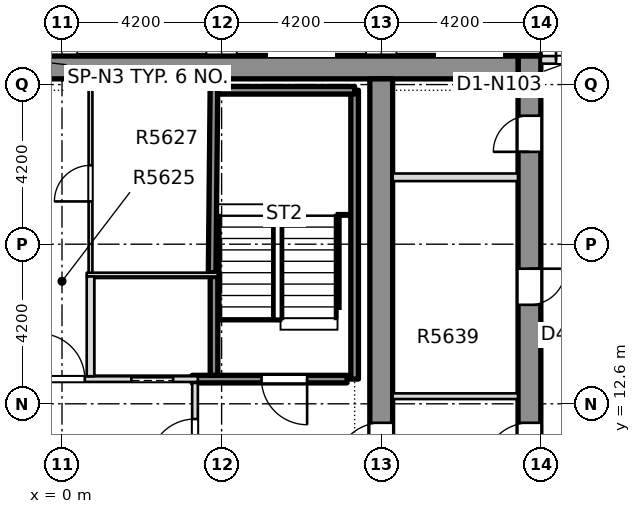
"""IFC4 building model, lengths in metres.
Left out: names, types, materials, properties, quantities, classifications, styles, units other than length and angle.
Written with IfcOpenShell. Run it as: python <this file> out.ifc"""

import sys

from ifc_helpers import new_model, si_unit, direction, frame, frame_2d, origin, place, context, subcontext, project, spatial, rectangle, extrude, element, fill, save


model = new_model("IFC4")
c1 = context("Model", 3, precision=1e-05, world=origin(), true_north=direction((0.0, 1.0)))
c2 = subcontext(c1, "Body", "Model", "MODEL_VIEW")
j1 = project(units=[si_unit("LENGTHUNIT", "METRE"), si_unit("PLANEANGLEUNIT", "RADIAN")], contexts=[c1])
p1 = place(None, origin())
s1 = spatial("IfcSite", under=j1, at=p1, CompositionType="ELEMENT")
p2 = place(p1, origin())
s2 = spatial("IfcBuilding", under=s1, at=p2, CompositionType="ELEMENT")
p3 = place(p2, frame((0.0, 0.0, 213.5)))
s3 = spatial("IfcBuildingStorey", under=s2, at=p3, CompositionType="ELEMENT", Elevation=213.5)
p4 = place(p3, frame((12.3, -8.4, -0.4), z_axis=(0.0, 0.0, 1.0), x_axis=(0.0, 1.0, 0.0)))
e1 = element("IfcWall", 1, at=p4, inside=s3, PredefinedType="SHEAR", context=c2, shape_type="SweptSolid", body=[
    extrude(rectangle(XDim=30.15, YDim=0.6, at=frame_2d((15.075, 0.0))), origin(), (0.0, 0.0, 1.0), 3.4),
])
p5 = place(p4, frame((3.416, 0.0, 0.4)))
e2 = element("IfcOpeningElement", 2, at=p5, cuts=e1, PredefinedType="OPENING", context=c2, shape_type="SweptSolid", body=[
    extrude(rectangle(XDim=0.95, YDim=2.1, at=frame_2d((0.475, 1.05))), frame((0.0, 0.31, 0.0), z_axis=(0.0, -1.0, 0.0), x_axis=(1.0, 0.0, 0.0)), (0.0, 0.0, 1.0), 0.62),
])
p6 = place(p4, frame((7.932, 0.0, 0.4)))
e3 = element("IfcOpeningElement", 3, at=p6, cuts=e1, PredefinedType="OPENING", context=c2, shape_type="SweptSolid", body=[
    extrude(rectangle(XDim=0.95, YDim=2.1, at=frame_2d((0.475, 1.05))), frame((0.0, 0.31, 0.0), z_axis=(0.0, -1.0, 0.0), x_axis=(1.0, 0.0, 0.0)), (0.0, 0.0, 1.0), 0.62),
])
p7 = place(p4, frame((12.144, 0.0, 0.4)))
e4 = element("IfcOpeningElement", 4, at=p7, cuts=e1, PredefinedType="OPENING", context=c2, shape_type="SweptSolid", body=[
    extrude(rectangle(XDim=0.95, YDim=2.1, at=frame_2d((0.475, 1.05))), frame((0.0, 0.31, 0.0), z_axis=(0.0, -1.0, 0.0), x_axis=(1.0, 0.0, 0.0)), (0.0, 0.0, 1.0), 0.62),
])
p8 = place(p4, frame((16.477, 0.0, 0.4)))
e5 = element("IfcOpeningElement", 5, at=p8, cuts=e1, PredefinedType="OPENING", context=c2, shape_type="SweptSolid", body=[
    extrude(rectangle(XDim=0.95, YDim=2.1, at=frame_2d((0.475, 1.05))), frame((0.0, 0.31, 0.0), z_axis=(0.0, -1.0, 0.0), x_axis=(1.0, 0.0, 0.0)), (0.0, 0.0, 1.0), 0.62),
])
p9 = place(p4, frame((23.605, 0.0, 0.4)))
e6 = element("IfcOpeningElement", 6, at=p9, cuts=e1, PredefinedType="OPENING", context=c2, shape_type="SweptSolid", body=[
    extrude(rectangle(XDim=0.95, YDim=2.1, at=frame_2d((0.475, 1.05))), frame((0.0, 0.31, 0.0), z_axis=(0.0, -1.0, 0.0), x_axis=(1.0, 0.0, 0.0)), (0.0, 0.0, 1.0), 0.62),
])
p10 = place(p4, frame((27.63, 0.0, 0.4)))
e7 = element("IfcOpeningElement", 7, at=p10, cuts=e1, PredefinedType="OPENING", context=c2, shape_type="SweptSolid", body=[
    extrude(rectangle(XDim=0.95, YDim=2.1, at=frame_2d((0.475, 1.05))), frame((0.0, 0.31, 0.0), z_axis=(0.0, -1.0, 0.0), x_axis=(1.0, 0.0, 0.0)), (0.0, 0.0, 1.0), 0.62),
])
p11 = place(p4, frame((19.3, 0.0, 0.4)))
e8 = element("IfcOpeningElement", 8, at=p11, cuts=e1, PredefinedType="OPENING", context=c2, shape_type="SweptSolid", body=[
    extrude(rectangle(XDim=1.2, YDim=2.1, at=frame_2d((0.6, 1.05))), frame((0.0, 0.31, 0.0), z_axis=(0.0, -1.0, 0.0), x_axis=(1.0, 0.0, 0.0)), (0.0, 0.0, 1.0), 0.62),
])
p12 = place(p3, frame((-12.0, 21.45, -0.4), z_axis=(0.0, 0.0, 1.0), x_axis=(1.0, 0.0, 0.0)))
e9 = element("IfcWall", 9, at=p12, inside=s3, PredefinedType="SHEAR", context=c2, shape_type="SweptSolid", body=[
    extrude(rectangle(XDim=24.0, YDim=0.6, at=frame_2d((12.0, 0.0))), origin(), (0.0, 0.0, 1.0), 3.4),
])
p13 = place(p3, frame((8.4, -7.8, -0.4), z_axis=(0.0, 0.0, 1.0), x_axis=(0.0, 1.0, 0.0)))
e10 = element("IfcWall", 10, at=p13, inside=s3, PredefinedType="SHEAR", context=c2, shape_type="SweptSolid", body=[
    extrude(rectangle(XDim=28.95, YDim=0.6, at=frame_2d((14.475, 0.0))), origin(), (0.0, 0.0, 1.0), 3.4),
])
p14 = place(p13, frame((18.7, 0.0, 0.4)))
e11 = element("IfcOpeningElement", 11, at=p14, cuts=e10, PredefinedType="OPENING", context=c2, shape_type="SweptSolid", body=[
    extrude(rectangle(XDim=1.2, YDim=2.1, at=frame_2d((0.6, 1.05))), frame((0.0, 0.31, 0.0), z_axis=(0.0, -1.0, 0.0), x_axis=(1.0, 0.0, 0.0)), (0.0, 0.0, 1.0), 0.62),
])
p15 = place(p3, frame((16.3, 21.65, 0.0), z_axis=(0.0, 0.0, 1.0), x_axis=(-1.0, 0.0, 0.0)))
e12 = element("IfcWall", 12, at=p15, inside=s3, PredefinedType="STANDARD", context=c2, shape_type="SweptSolid", body=[
    extrude(rectangle(XDim=3.7, YDim=0.2, at=frame_2d((1.85, 0.0))), origin(), (0.0, 0.0, 1.0), 3.0),
])
p16 = place(p15, frame((2.3, 0.0, 0.0)))
e13 = element("IfcOpeningElement", 13, at=p16, cuts=e12, PredefinedType="OPENING", context=c2, shape_type="SweptSolid", body=[
    extrude(rectangle(XDim=1.0, YDim=2.4, at=frame_2d((0.5, 1.2))), frame((0.0, 0.11, 0.0), z_axis=(0.0, -1.0, 0.0), x_axis=(1.0, 0.0, 0.0)), (0.0, 0.0, 1.0), 0.22),
])
p17 = place(p3, frame((-3.575, 13.25, 0.0), z_axis=(0.0, 0.0, 1.0), x_axis=(1.0, 0.0, 0.0)))
e14 = element("IfcWall", 14, at=p17, inside=s3, PredefinedType="PARTITIONING", context=c2, shape_type="SweptSolid", body=[
    extrude(rectangle(XDim=7.15, YDim=0.15, at=frame_2d((3.575, 0.0))), origin(), (0.0, 0.0, 1.0), 3.0),
])
p18 = place(p17, frame((0.6, 0.0, 0.0)))
e15 = element("IfcOpeningElement", 15, at=p18, cuts=e14, PredefinedType="OPENING", context=c2, shape_type="SweptSolid", body=[
    extrude(rectangle(XDim=1.2, YDim=2.1, at=frame_2d((0.6, 1.05))), frame((0.0, 0.085, 0.0), z_axis=(0.0, -1.0, 0.0), x_axis=(1.0, 0.0, 0.0)), (0.0, 0.0, 1.0), 0.17),
])
p19 = place(p17, frame((5.4, 0.0, 0.0)))
e16 = element("IfcOpeningElement", 16, at=p19, cuts=e14, PredefinedType="OPENING", context=c2, shape_type="SweptSolid", body=[
    extrude(rectangle(XDim=1.1, YDim=2.1, at=frame_2d((0.55, 1.05))), frame((0.0, 0.085, 0.0), z_axis=(0.0, -1.0, 0.0), x_axis=(1.0, 0.0, 0.0)), (0.0, 0.0, 1.0), 0.17),
])
p20 = place(p17, frame((2.975, 0.0, 0.0)))
e17 = element("IfcOpeningElement", 17, at=p20, cuts=e14, PredefinedType="OPENING", context=c2, shape_type="SweptSolid", body=[
    extrude(rectangle(XDim=1.2, YDim=2.1, at=frame_2d((0.6, 1.05))), frame((0.0, 0.085, 0.0), z_axis=(0.0, -1.0, 0.0), x_axis=(1.0, 0.0, 0.0)), (0.0, 0.0, 1.0), 0.17),
])
p21 = place(p3, frame((3.425, 13.25, 0.0), z_axis=(0.0, 0.0, 1.0), x_axis=(1.0, 0.0, 0.0)))
e18 = element("IfcWall", 18, at=p21, inside=s3, PredefinedType="SOLIDWALL", context=c2, shape_type="SweptSolid", body=[
    extrude(rectangle(XDim=4.075, YDim=0.2, at=frame_2d((2.038, 0.0))), origin(), (0.0, 0.0, 1.0), 3.0),
])
p22 = place(p21, frame((1.825, 0.0, 0.0)))
e19 = element("IfcOpeningElement", 19, at=p22, cuts=e18, PredefinedType="OPENING", context=c2, shape_type="SweptSolid", body=[
    extrude(rectangle(XDim=1.2, YDim=2.1, at=frame_2d((0.6, 1.05))), frame((0.0, 0.11, 0.0), z_axis=(0.0, -1.0, 0.0), x_axis=(1.0, 0.0, 0.0)), (0.0, 0.0, 1.0), 0.22),
])
p23 = place(p3, frame((0.65, 16.0, 0.0), z_axis=(0.0, 0.0, 1.0), x_axis=(1.0, 0.0, 0.0)))
e20 = element("IfcWall", 20, at=p23, inside=s3, PredefinedType="PARTITIONING", context=c2, shape_type="SweptSolid", body=[
    extrude(rectangle(XDim=3.45, YDim=0.1, at=frame_2d((1.725, 0.0))), origin(), (0.0, 0.0, 1.0), 3.0),
])
p24 = place(p3, frame((0.75, 13.325, 0.0), z_axis=(0.0, 0.0, 1.0), x_axis=(0.0, 1.0, 0.0)))
e21 = element("IfcWall", 21, at=p24, inside=s3, PredefinedType="PARTITIONING", context=c2, shape_type="SweptSolid", body=[
    extrude(rectangle(XDim=2.625, YDim=0.2, at=frame_2d((1.312, 0.0))), origin(), (0.0, 0.0, 1.0), 3.0),
])
p25 = place(p3, frame((0.75, 16.05, 0.0), z_axis=(0.0, 0.0, 1.0), x_axis=(0.0, 1.0, 0.0)))
e22 = element("IfcWall", 22, at=p25, inside=s3, PredefinedType="PARTITIONING", context=c2, shape_type="SweptSolid", body=[
    extrude(rectangle(XDim=5.099, YDim=0.1, at=frame_2d((2.549, 0.0))), origin(), (0.0, 0.0, 1.0), 3.0),
])
p26 = place(p25, frame((1.875, 0.0, 0.0)))
e23 = element("IfcOpeningElement", 23, at=p26, cuts=e22, PredefinedType="OPENING", context=c2, shape_type="SweptSolid", body=[
    extrude(rectangle(XDim=0.95, YDim=2.1, at=frame_2d((0.475, 1.05))), frame((0.0, 0.06, 0.0), z_axis=(0.0, -1.0, 0.0), x_axis=(1.0, 0.0, 0.0)), (0.0, 0.0, 1.0), 0.12),
])
p27 = place(p3, frame((3.5, 10.075, 0.0), z_axis=(0.0, 0.0, 1.0), x_axis=(0.0, 1.0, 0.0)))
e24 = element("IfcWall", 24, at=p27, inside=s3, PredefinedType="PARTITIONING", context=c2, shape_type="SweptSolid", body=[
    extrude(rectangle(XDim=3.075, YDim=0.15, at=frame_2d((1.538, 0.0))), origin(), (0.0, 0.0, 1.0), 3.0),
])
p28 = place(p27, frame((0.925, 0.0, 0.0)))
e25 = element("IfcOpeningElement", 25, at=p28, cuts=e24, PredefinedType="OPENING", context=c2, shape_type="SweptSolid", body=[
    extrude(rectangle(XDim=1.2, YDim=2.1, at=frame_2d((0.6, 1.05))), frame((0.0, 0.085, 0.0), z_axis=(0.0, -1.0, 0.0), x_axis=(1.0, 0.0, 0.0)), (0.0, 0.0, 1.0), 0.17),
])
p29 = place(p3, frame((4.0, 13.35, 0.0), z_axis=(0.0, 0.0, 1.0), x_axis=(0.0, 1.0, 0.0)))
e26 = element("IfcWall", 26, at=p29, inside=s3, PredefinedType="SOLIDWALL", context=c2, shape_type="SweptSolid", body=[
    extrude(rectangle(XDim=2.6, YDim=0.2, at=frame_2d((1.3, 0.0))), origin(), (0.0, 0.0, 1.0), 3.0),
])
p30 = place(p3, frame((3.95, 16.05, 0.0), z_axis=(0.0, 0.0, 1.0), x_axis=(0.009911993103, 0.99995087499, 0.0)))
e27 = element("IfcWall", 27, at=p30, inside=s3, PredefinedType="SOLIDWALL", context=c2, shape_type="SweptSolid", body=[
    extrude(rectangle(XDim=5.049, YDim=0.2, at=frame_2d((2.525, 0.0))), origin(), (0.0, 0.0, 1.0), 3.0),
])
p31 = place(p3, frame((8.701, 12.8, 0.0), z_axis=(0.0, 0.0, 1.0), x_axis=(1.0, 0.0, 0.0)))
e28 = element("IfcWall", 28, at=p31, inside=s3, PredefinedType="PARTITIONING", context=c2, shape_type="SweptSolid", body=[
    extrude(rectangle(XDim=3.298, YDim=0.15, at=frame_2d((1.649, 0.0))), origin(), (0.0, 0.0, 1.0), 3.0),
])
p32 = place(p3, frame((8.701, 18.56, 0.0), z_axis=(0.0, 0.0, 1.0), x_axis=(1.0, 0.0, 0.0)))
e29 = element("IfcWall", 29, at=p32, inside=s3, PredefinedType="PARTITIONING", context=c2, shape_type="SweptSolid", body=[
    extrude(rectangle(XDim=3.298, YDim=0.2, at=frame_2d((1.649, 0.0))), origin(), (0.0, 0.0, 1.0), 3.0),
])
p33 = place(p3, frame((7.7, 13.25, 0.0), z_axis=(0.0, 0.0, 1.0), x_axis=(0.0, 1.0, 0.0)))
e30 = element("IfcWall", 30, at=p33, inside=s3, PredefinedType="SOLIDWALL", context=c2, shape_type="SweptSolid", body=[
    extrude(rectangle(XDim=7.6, YDim=0.2, at=frame_2d((3.8, 0.0))), origin(), (0.0, 0.0, 1.0), 3.0),
])
p34 = place(p3, frame((4.1, 20.85, 0.0), z_axis=(0.0, 0.0, 1.0), x_axis=(1.0, 0.0, 0.0)))
e31 = element("IfcWall", 31, at=p34, inside=s3, PredefinedType="SOLIDWALL", context=c2, shape_type="SweptSolid", body=[
    extrude(rectangle(XDim=3.6, YDim=0.2, at=frame_2d((1.8, 0.0))), origin(), (0.0, 0.0, 1.0), 3.0),
])
p35 = place(p16, origin())
e32 = element("IfcDoor", 32, at=p35, inside=s3, OperationType="SINGLE_SWING_LEFT", PredefinedType="DOOR", context=c2, shape_type="SweptSolid", body=[
    extrude(rectangle(XDim=1.0, YDim=2.4, at=frame_2d((0.5, 1.2))), frame((0.0, 0.025, 0.0), z_axis=(0.0, -1.0, 0.0), x_axis=(1.0, 0.0, 0.0)), (0.0, 0.0, 1.0), 0.05),
])
fill(e13, e32)
p36 = place(p22, origin())
e33 = element("IfcDoor", 33, at=p36, inside=s3, OperationType="SINGLE_SWING_RIGHT", PredefinedType="DOOR", context=c2, shape_type="SweptSolid", body=[
    extrude(rectangle(XDim=1.2, YDim=2.1, at=frame_2d((0.6, 1.05))), frame((0.0, 0.025, 0.0), z_axis=(0.0, -1.0, 0.0), x_axis=(1.0, 0.0, 0.0)), (0.0, 0.0, 1.0), 0.05),
])
fill(e19, e33)
p37 = place(p19, origin())
e34 = element("IfcDoor", 34, at=p37, inside=s3, OperationType="SLIDING_TO_LEFT", PredefinedType="DOOR", context=c2, shape_type="SweptSolid", body=[
    extrude(rectangle(XDim=1.1, YDim=2.1, at=frame_2d((0.55, 1.05))), frame((0.0, 0.025, 0.0), z_axis=(0.0, -1.0, 0.0), x_axis=(1.0, 0.0, 0.0)), (0.0, 0.0, 1.0), 0.05),
])
fill(e16, e34)
p38 = place(p20, origin())
e35 = element("IfcDoor", 35, at=p38, inside=s3, OperationType="SINGLE_SWING_RIGHT", PredefinedType="DOOR", context=c2, shape_type="SweptSolid", body=[
    extrude(rectangle(XDim=1.2, YDim=2.1, at=frame_2d((0.6, 1.05))), frame((0.0, 0.025, 0.0), z_axis=(0.0, -1.0, 0.0), x_axis=(1.0, 0.0, 0.0)), (0.0, 0.0, 1.0), 0.05),
])
fill(e17, e35)
p39 = place(p26, origin())
e36 = element("IfcDoor", 36, at=p39, inside=s3, OperationType="SINGLE_SWING_LEFT", PredefinedType="DOOR", context=c2, shape_type="SweptSolid", body=[
    extrude(rectangle(XDim=0.95, YDim=2.1, at=frame_2d((0.475, 1.05))), frame((0.0, 0.025, 0.0), z_axis=(0.0, -1.0, 0.0), x_axis=(1.0, 0.0, 0.0)), (0.0, 0.0, 1.0), 0.05),
])
fill(e23, e36)
p40 = place(p28, origin())
e37 = element("IfcDoor", 37, at=p40, inside=s3, OperationType="SINGLE_SWING_LEFT", PredefinedType="DOOR", context=c2, shape_type="SweptSolid", body=[
    extrude(rectangle(XDim=1.2, YDim=2.1, at=frame_2d((0.6, 1.05))), frame((0.0, 0.025, 0.0), z_axis=(0.0, -1.0, 0.0), x_axis=(1.0, 0.0, 0.0)), (0.0, 0.0, 1.0), 0.05),
])
fill(e25, e37)
p41 = place(p9, origin())
e38 = element("IfcDoor", 38, at=p41, inside=s3, OperationType="SINGLE_SWING_LEFT", PredefinedType="DOOR", context=c2, shape_type="SweptSolid", body=[
    extrude(rectangle(XDim=0.95, YDim=2.1, at=frame_2d((0.475, 1.05))), frame((0.0, 0.025, 0.0), z_axis=(0.0, -1.0, 0.0), x_axis=(1.0, 0.0, 0.0)), (0.0, 0.0, 1.0), 0.05),
])
fill(e6, e38)
p42 = place(p10, origin())
e39 = element("IfcDoor", 39, at=p42, inside=s3, OperationType="SINGLE_SWING_LEFT", PredefinedType="DOOR", context=c2, shape_type="SweptSolid", body=[
    extrude(rectangle(XDim=0.95, YDim=2.1, at=frame_2d((0.475, 1.05))), frame((0.0, 0.025, 0.0), z_axis=(0.0, -1.0, 0.0), x_axis=(1.0, 0.0, 0.0)), (0.0, 0.0, 1.0), 0.05),
])
fill(e7, e39)
p43 = place(p11, origin())
e40 = element("IfcDoor", 40, at=p43, inside=s3, OperationType="SINGLE_SWING_LEFT", PredefinedType="DOOR", context=c2, shape_type="SweptSolid", body=[
    extrude(rectangle(XDim=1.2, YDim=2.1, at=frame_2d((0.6, 1.05))), frame((0.0, 0.025, 0.0), z_axis=(0.0, -1.0, 0.0), x_axis=(1.0, 0.0, 0.0)), (0.0, 0.0, 1.0), 0.05),
])
fill(e8, e40)
p44 = place(p14, origin())
e41 = element("IfcDoor", 41, at=p44, inside=s3, OperationType="SINGLE_SWING_LEFT", PredefinedType="DOOR", context=c2, shape_type="SweptSolid", body=[
    extrude(rectangle(XDim=1.2, YDim=2.1, at=frame_2d((0.6, 1.05))), frame((0.0, 0.025, 0.0), z_axis=(0.0, -1.0, 0.0), x_axis=(1.0, 0.0, 0.0)), (0.0, 0.0, 1.0), 0.05),
])
fill(e11, e41)
save(model, sys.argv[1])
